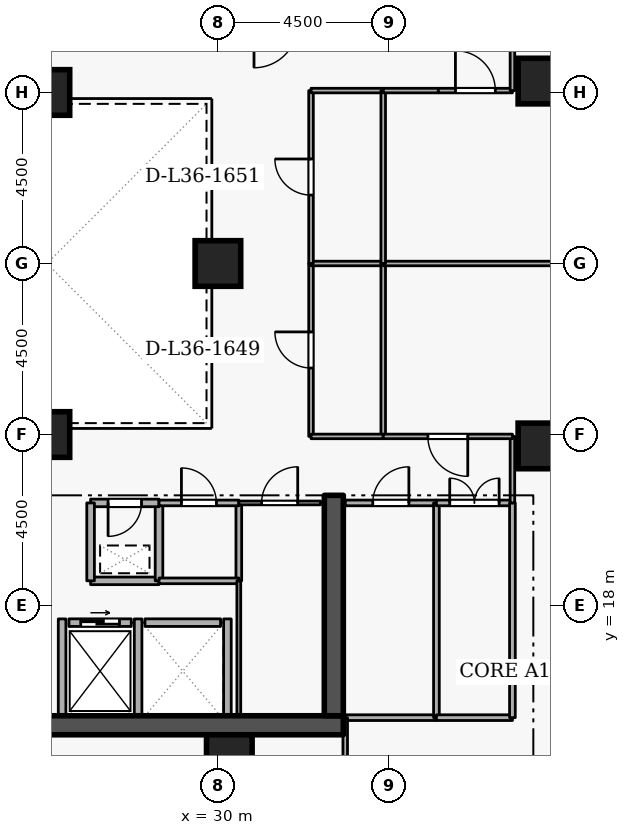
"""IFC4 building model, lengths in metres.
Left out: names, types, materials, properties, quantities, classifications, styles, units other than length and angle.
Written with IfcOpenShell. Run it as: python <this file> out.ifc"""

import sys

from ifc_helpers import new_model, si_unit, direction, frame, frame_2d, origin, origin_2d, place, context, subcontext, project, spatial, rectangle, extrude, element, fill, save


model = new_model("IFC4")
c1 = context("Model", 3, precision=1e-05, world=origin(), true_north=direction((0.0, 1.0)))
c2 = subcontext(c1, "Body", "Model", "MODEL_VIEW")
j1 = project(units=[si_unit("LENGTHUNIT", "METRE"), si_unit("PLANEANGLEUNIT", "RADIAN")], contexts=[c1])
p1 = place(None, origin())
s1 = spatial("IfcSite", under=j1, at=p1, CompositionType="ELEMENT")
p2 = place(p1, origin())
s2 = spatial("IfcBuilding", under=s1, at=p2, CompositionType="ELEMENT")
p3 = place(p2, frame((0.0, 0.0, 137.7)))
s3 = spatial("IfcBuildingStorey", under=s2, at=p3, CompositionType="ELEMENT", Elevation=137.7)
p4 = place(p3, frame((17.7, 14.85, 0.0), z_axis=(0.0, 0.0, 1.0), x_axis=(1.0, 0.0, 0.0)))
e1 = element("IfcWall", 1, at=p4, inside=s3, PredefinedType="SHEAR", context=c2, shape_type="SweptSolid", body=[
    extrude(rectangle(XDim=15.6, YDim=0.5, at=frame_2d((7.8, 0.0))), origin(), (0.0, 0.0, 1.0), 3.6),
])
p5 = place(p3, frame((33.05, 15.1, 0.0), z_axis=(0.0, 0.0, 1.0), x_axis=(0.0, 1.0, 0.0)))
e2 = element("IfcWall", 2, at=p5, inside=s3, PredefinedType="SHEAR", context=c2, shape_type="SweptSolid", body=[
    extrude(rectangle(XDim=5.8, YDim=0.5, at=frame_2d((2.9, 0.0))), origin(), (0.0, 0.0, 1.0), 3.6),
])
for number, where, z_axis, x_axis in (
    (3, (38.5, 22.2, 0.0), (0.0, 0.0, 1.0), (1.0, 0.0, 0.0)),
    (4, (38.5, 31.8, 0.0), (0.0, 0.0, 1.0), (1.0, 0.0, 0.0)),
    (5, (30.3, 14.0, 0.0), (0.0, 0.0, 1.0), (1.0, 0.0, 0.0)),
    (6, (25.5, 22.5, 0.0), (0.0, 0.0, 1.0), (1.0, 0.0, 0.0)),
    (7, (25.5, 31.5, 0.0), (0.0, 0.0, 1.0), (1.0, 0.0, 0.0)),
    (8, (30.0, 27.0, 0.0), (0.0, 0.0, 1.0), (1.0, 0.0, 0.0)),
):
    element("IfcColumn", number, at=place(p3, frame(where, z_axis=z_axis, x_axis=x_axis)), inside=s3, PredefinedType="COLUMN", context=c2, shape_type="SweptSolid", body=[
        extrude(rectangle(XDim=1.2, YDim=1.2, at=origin_2d()), origin(), (0.0, 0.0, 1.0), 3.6),
    ])
p6 = place(p3, frame((26.08, 17.55, 0.0), z_axis=(0.0, 0.0, 1.0), x_axis=(1.0, 0.0, 0.0)))
e9 = element("IfcWall", 9, at=p6, inside=s3, PredefinedType="STANDARD", context=c2, shape_type="SweptSolid", body=[
    extrude(rectangle(XDim=1.64, YDim=0.2, at=frame_2d((0.82, 0.0))), origin(), (0.0, 0.0, 1.0), 3.26),
])
p7 = place(p6, frame((0.31, 0.0, 0.0)))
e10 = element("IfcOpeningElement", 10, at=p7, cuts=e9, PredefinedType="OPENING", context=c2, shape_type="SweptSolid", body=[
    extrude(rectangle(XDim=1.02, YDim=2.06, at=frame_2d((0.51, 1.03))), frame((0.0, 0.11, 0.0), z_axis=(0.0, -1.0, 0.0), x_axis=(1.0, 0.0, 0.0)), (0.0, 0.0, 1.0), 0.22),
])
p8 = place(p3, frame((28.08, 17.55, 0.0), z_axis=(0.0, 0.0, 1.0), x_axis=(1.0, 0.0, 0.0)))
e11 = element("IfcWall", 11, at=p8, inside=s3, PredefinedType="STANDARD", context=c2, shape_type="SweptSolid", body=[
    extrude(rectangle(XDim=1.99, YDim=0.2, at=frame_2d((0.995, 0.0))), origin(), (0.0, 0.0, 1.0), 3.26),
])
for number, where, z_axis, x_axis in (
    (12, (27.9, 15.112, 0.0), (0.0, 0.0, 1.0), (0.0, 1.0, 0.0)),
    (13, (25.9, 15.112, 0.0), (0.0, 0.0, 1.0), (0.0, 1.0, 0.0)),
    (14, (30.25, 15.112, 0.0), (0.0, 0.0, 1.0), (0.0, 1.0, 0.0)),
):
    element("IfcWall", number, at=place(p3, frame(where, z_axis=z_axis, x_axis=x_axis)), inside=s3, PredefinedType="STANDARD", context=c2, shape_type="SweptSolid", body=[
        extrude(rectangle(XDim=2.536, YDim=0.2, at=frame_2d((1.268, 0.0))), origin(), (0.0, 0.0, 1.0), 3.26),
    ])
p9 = place(p3, frame((26.65, 18.65, 0.0), z_axis=(0.0, 0.0, 1.0), x_axis=(1.0, 0.0, 0.0)))
e15 = element("IfcWall", 15, at=p9, inside=s3, PredefinedType="STANDARD", context=c2, shape_type="SweptSolid", body=[
    extrude(rectangle(XDim=1.8, YDim=0.2, at=frame_2d((0.9, 0.0))), origin(), (0.0, 0.0, 1.0), 3.26),
])
p10 = place(p3, frame((28.45, 18.65, 0.0), z_axis=(0.0, 0.0, 1.0), x_axis=(0.0, 1.0, 0.0)))
e16 = element("IfcWall", 16, at=p10, inside=s3, PredefinedType="STANDARD", context=c2, shape_type="SweptSolid", body=[
    extrude(rectangle(XDim=2.05, YDim=0.2, at=frame_2d((1.025, 0.0))), origin(), (0.0, 0.0, 1.0), 3.26),
])
p11 = place(p3, frame((28.45, 20.7, 0.0), z_axis=(0.0, 0.0, 1.0), x_axis=(-1.0, 0.0, 0.0)))
e17 = element("IfcWall", 17, at=p11, inside=s3, PredefinedType="STANDARD", context=c2, shape_type="SweptSolid", body=[
    extrude(rectangle(XDim=1.8, YDim=0.2, at=frame_2d((0.9, 0.0))), origin(), (0.0, 0.0, 1.0), 3.26),
])
p12 = place(p11, frame((0.46, 0.0, 0.0)))
e18 = element("IfcOpeningElement", 18, at=p12, cuts=e17, PredefinedType="OPENING", context=c2, shape_type="SweptSolid", body=[
    extrude(rectangle(XDim=0.88, YDim=2.04, at=frame_2d((0.44, 1.02))), frame((0.0, 0.11, 0.0), z_axis=(0.0, -1.0, 0.0), x_axis=(1.0, 0.0, 0.0)), (0.0, 0.0, 1.0), 0.22),
])
p13 = place(p3, frame((26.65, 20.7, 0.0), z_axis=(0.0, 0.0, 1.0), x_axis=(0.0, -1.0, 0.0)))
e19 = element("IfcWall", 19, at=p13, inside=s3, PredefinedType="STANDARD", context=c2, shape_type="SweptSolid", body=[
    extrude(rectangle(XDim=2.05, YDim=0.2, at=frame_2d((1.025, 0.0))), origin(), (0.0, 0.0, 1.0), 3.26),
])
p14 = place(p3, frame((30.55, 20.7, 0.0), z_axis=(0.0, 0.0, 1.0), x_axis=(0.0, -1.0, 0.0)))
e20 = element("IfcWall", 20, at=p14, inside=s3, PredefinedType="PARTITIONING", context=c2, shape_type="SweptSolid", body=[
    extrude(rectangle(XDim=2.05, YDim=0.15, at=frame_2d((1.025, 0.0))), origin(), (0.0, 0.0, 1.0), 3.26),
])
p15 = place(p3, frame((30.55, 18.65, 0.0), z_axis=(0.0, 0.0, 1.0), x_axis=(-1.0, 0.0, 0.0)))
e21 = element("IfcWall", 21, at=p15, inside=s3, PredefinedType="PARTITIONING", context=c2, shape_type="SweptSolid", body=[
    extrude(rectangle(XDim=2.1, YDim=0.15, at=frame_2d((1.05, 0.0))), origin(), (0.0, 0.0, 1.0), 3.26),
])
p16 = place(p3, frame((28.45, 20.7, 0.0), z_axis=(0.0, 0.0, 1.0), x_axis=(1.0, 0.0, 0.0)))
e22 = element("IfcWall", 22, at=p16, inside=s3, PredefinedType="PARTITIONING", context=c2, shape_type="SweptSolid", body=[
    extrude(rectangle(XDim=2.1, YDim=0.15, at=frame_2d((1.05, 0.0))), origin(), (0.0, 0.0, 1.0), 3.26),
])
p17 = place(p16, frame((0.59, 0.0, 0.0)))
e23 = element("IfcOpeningElement", 23, at=p17, cuts=e22, PredefinedType="OPENING", context=c2, shape_type="SweptSolid", body=[
    extrude(rectangle(XDim=0.92, YDim=2.08, at=frame_2d((0.46, 1.04))), frame((0.0, 0.085, 0.0), z_axis=(0.0, -1.0, 0.0), x_axis=(1.0, 0.0, 0.0)), (0.0, 0.0, 1.0), 0.17),
])
p18 = place(p3, frame((30.55, 15.1, 0.0), z_axis=(0.0, 0.0, 1.0), x_axis=(0.0, 1.0, 0.0)))
e24 = element("IfcWall", 24, at=p18, inside=s3, PredefinedType="PARTITIONING", context=c2, shape_type="SweptSolid", body=[
    extrude(rectangle(XDim=3.55, YDim=0.1, at=frame_2d((1.775, 0.0))), origin(), (0.0, 0.0, 1.0), 3.26),
])
p19 = place(p3, frame((30.55, 20.7, 0.0), z_axis=(0.0, 0.0, 1.0), x_axis=(1.0, 0.0, 0.0)))
e25 = element("IfcWall", 25, at=p19, inside=s3, PredefinedType="PARTITIONING", context=c2, shape_type="SweptSolid", body=[
    extrude(rectangle(XDim=2.15, YDim=0.1, at=frame_2d((1.075, 0.0))), origin(), (0.0, 0.0, 1.0), 3.26),
])
p20 = place(p19, frame((0.6, 0.0, 0.0)))
e26 = element("IfcOpeningElement", 26, at=p20, cuts=e25, PredefinedType="OPENING", context=c2, shape_type="SweptSolid", body=[
    extrude(rectangle(XDim=0.95, YDim=2.1, at=frame_2d((0.475, 1.05))), frame((0.0, 0.06, 0.0), z_axis=(0.0, -1.0, 0.0), x_axis=(1.0, 0.0, 0.0)), (0.0, 0.0, 1.0), 0.12),
])
p21 = place(p3, frame((35.75, 15.05, 0.0), z_axis=(0.0, 0.0, 1.0), x_axis=(-1.0, 0.0, 0.0)))
e27 = element("IfcWall", 27, at=p21, inside=s3, PredefinedType="PARTITIONING", context=c2, shape_type="SweptSolid", body=[
    extrude(rectangle(XDim=2.4, YDim=0.15, at=frame_2d((1.2, 0.0))), origin(), (0.0, 0.0, 1.0), 3.26),
])
p22 = place(p3, frame((33.35, 20.7, 0.0), z_axis=(0.0, 0.0, 1.0), x_axis=(1.0, 0.0, 0.0)))
e28 = element("IfcWall", 28, at=p22, inside=s3, PredefinedType="PARTITIONING", context=c2, shape_type="SweptSolid", body=[
    extrude(rectangle(XDim=2.4, YDim=0.15, at=frame_2d((1.2, 0.0))), origin(), (0.0, 0.0, 1.0), 3.26),
])
p23 = place(p22, frame((0.725, 0.0, 0.0)))
e29 = element("IfcOpeningElement", 29, at=p23, cuts=e28, PredefinedType="OPENING", context=c2, shape_type="SweptSolid", body=[
    extrude(rectangle(XDim=0.95, YDim=2.1, at=frame_2d((0.475, 1.05))), frame((0.0, 0.085, 0.0), z_axis=(0.0, -1.0, 0.0), x_axis=(1.0, 0.0, 0.0)), (0.0, 0.0, 1.0), 0.17),
])
p24 = place(p3, frame((35.75, 20.7, 0.0), z_axis=(0.0, 0.0, 1.0), x_axis=(0.0, -1.0, 0.0)))
e30 = element("IfcWall", 30, at=p24, inside=s3, PredefinedType="PARTITIONING", context=c2, shape_type="SweptSolid", body=[
    extrude(rectangle(XDim=5.65, YDim=0.15, at=frame_2d((2.825, 0.0))), origin(), (0.0, 0.0, 1.0), 3.26),
])
p25 = place(p3, frame((37.75, 15.05, 0.0), z_axis=(0.0, 0.0, 1.0), x_axis=(-1.0, 0.0, 0.0)))
e31 = element("IfcWall", 31, at=p25, inside=s3, PredefinedType="PARTITIONING", context=c2, shape_type="SweptSolid", body=[
    extrude(rectangle(XDim=2.0, YDim=0.15, at=frame_2d((1.0, 0.0))), origin(), (0.0, 0.0, 1.0), 3.26),
])
p26 = place(p3, frame((35.75, 20.7, 0.0), z_axis=(0.0, 0.0, 1.0), x_axis=(1.0, 0.0, 0.0)))
e32 = element("IfcWall", 32, at=p26, inside=s3, PredefinedType="PARTITIONING", context=c2, shape_type="SweptSolid", body=[
    extrude(rectangle(XDim=2.0, YDim=0.15, at=frame_2d((1.0, 0.0))), origin(), (0.0, 0.0, 1.0), 3.26),
])
p27 = place(p26, frame((0.35, 0.0, 0.0)))
e33 = element("IfcOpeningElement", 33, at=p27, cuts=e32, PredefinedType="OPENING", context=c2, shape_type="SweptSolid", body=[
    extrude(rectangle(XDim=1.3, YDim=2.12, at=frame_2d((0.65, 1.06))), frame((0.0, 0.085, 0.0), z_axis=(0.0, -1.0, 0.0), x_axis=(1.0, 0.0, 0.0)), (0.0, 0.0, 1.0), 0.17),
])
p28 = place(p3, frame((37.75, 20.7, 0.0), z_axis=(0.0, 0.0, 1.0), x_axis=(0.0, -1.0, 0.0)))
e34 = element("IfcWall", 34, at=p28, inside=s3, PredefinedType="PARTITIONING", context=c2, shape_type="SweptSolid", body=[
    extrude(rectangle(XDim=5.65, YDim=0.15, at=frame_2d((2.825, 0.0))), origin(), (0.0, 0.0, 1.0), 3.26),
])
p29 = place(p3, frame((32.45, 22.45, 0.0), z_axis=(0.0, 0.0, 1.0), x_axis=(0.0, 1.0, 0.0)))
e35 = element("IfcWall", 35, at=p29, inside=s3, PredefinedType="PARTITIONING", context=c2, shape_type="SweptSolid", body=[
    extrude(rectangle(XDim=4.55, YDim=0.12, at=frame_2d((2.275, 0.0))), origin(), (0.0, 0.0, 1.0), 3.26),
])
p30 = place(p29, frame((1.8, 0.0, 0.0)))
e36 = element("IfcOpeningElement", 36, at=p30, cuts=e35, PredefinedType="OPENING", context=c2, shape_type="SweptSolid", body=[
    extrude(rectangle(XDim=0.95, YDim=2.1, at=frame_2d((0.475, 1.05))), frame((0.0, 0.07, 0.0), z_axis=(0.0, -1.0, 0.0), x_axis=(1.0, 0.0, 0.0)), (0.0, 0.0, 1.0), 0.14),
])
p31 = place(p3, frame((32.45, 27.0, 0.0), z_axis=(0.0, 0.0, 1.0), x_axis=(1.0, 0.0, 0.0)))
e37 = element("IfcWall", 37, at=p31, inside=s3, PredefinedType="PARTITIONING", context=c2, shape_type="SweptSolid", body=[
    extrude(rectangle(XDim=1.9, YDim=0.12, at=frame_2d((0.95, 0.0))), origin(), (0.0, 0.0, 1.0), 2.802),
])
p32 = place(p3, frame((34.35, 27.0, 0.0), z_axis=(0.0, 0.0, 1.0), x_axis=(0.0, -1.0, 0.0)))
e38 = element("IfcWall", 38, at=p32, inside=s3, PredefinedType="PARTITIONING", context=c2, shape_type="SweptSolid", body=[
    extrude(rectangle(XDim=4.55, YDim=0.12, at=frame_2d((2.275, 0.0))), origin(), (0.0, 0.0, 1.0), 3.26),
])
p33 = place(p3, frame((34.35, 22.45, 0.0), z_axis=(0.0, 0.0, 1.0), x_axis=(-1.0, 0.0, 0.0)))
e39 = element("IfcWall", 39, at=p33, inside=s3, PredefinedType="PARTITIONING", context=c2, shape_type="SweptSolid", body=[
    extrude(rectangle(XDim=1.9, YDim=0.12, at=frame_2d((0.95, 0.0))), origin(), (0.0, 0.0, 1.0), 3.26),
])
p34 = place(p3, frame((33.35, 3.28, 0.0), z_axis=(0.0, 0.0, 1.0), x_axis=(0.0, 1.0, 0.0)))
e40 = element("IfcWall", 40, at=p34, inside=s3, PredefinedType="PARTITIONING", context=c2, shape_type="SweptSolid", body=[
    extrude(rectangle(XDim=11.77, YDim=0.12, at=frame_2d((5.885, 0.0))), origin(), (0.0, 0.0, 1.0), 2.465),
])
p35 = place(p3, frame((37.75, 20.7, 0.0), z_axis=(0.0, 0.0, 1.0), x_axis=(0.0, 1.0, 0.0)))
e41 = element("IfcWall", 41, at=p35, inside=s3, PredefinedType="PARTITIONING", context=c2, shape_type="SweptSolid", body=[
    extrude(rectangle(XDim=1.75, YDim=0.12, at=frame_2d((0.875, 0.0))), origin(), (0.0, 0.0, 1.0), 3.26),
])
p36 = place(p3, frame((37.75, 22.45, 0.0), z_axis=(0.0, 0.0, 1.0), x_axis=(-1.0, 0.0, 0.0)))
e42 = element("IfcWall", 42, at=p36, inside=s3, PredefinedType="PARTITIONING", context=c2, shape_type="SweptSolid", body=[
    extrude(rectangle(XDim=3.4, YDim=0.12, at=frame_2d((1.7, 0.0))), origin(), (0.0, 0.0, 1.0), 3.26),
])
p37 = place(p36, frame((1.175, 0.0, 0.0)))
e43 = element("IfcOpeningElement", 43, at=p37, cuts=e42, PredefinedType="OPENING", context=c2, shape_type="SweptSolid", body=[
    extrude(rectangle(XDim=1.05, YDim=2.1, at=frame_2d((0.525, 1.05))), frame((0.0, 0.07, 0.0), z_axis=(0.0, -1.0, 0.0), x_axis=(1.0, 0.0, 0.0)), (0.0, 0.0, 1.0), 0.14),
])
p38 = place(p3, frame((34.35, 27.0, 0.0), z_axis=(0.0, 0.0, 1.0), x_axis=(1.0, 0.0, 0.0)))
e44 = element("IfcWall", 44, at=p38, inside=s3, PredefinedType="PARTITIONING", context=c2, shape_type="SweptSolid", body=[
    extrude(rectangle(XDim=8.87, YDim=0.12, at=frame_2d((4.435, 0.0))), origin(), (0.0, 0.0, 1.0), 2.802),
])
p39 = place(p3, frame((32.45, 27.0, 0.0), z_axis=(0.0, 0.0, 1.0), x_axis=(0.0, 1.0, 0.0)))
e45 = element("IfcWall", 45, at=p39, inside=s3, PredefinedType="PARTITIONING", context=c2, shape_type="SweptSolid", body=[
    extrude(rectangle(XDim=4.55, YDim=0.12, at=frame_2d((2.275, 0.0))), origin(), (0.0, 0.0, 1.0), 3.26),
])
p40 = place(p39, frame((1.8, 0.0, 0.0)))
e46 = element("IfcOpeningElement", 46, at=p40, cuts=e45, PredefinedType="OPENING", context=c2, shape_type="SweptSolid", body=[
    extrude(rectangle(XDim=0.95, YDim=2.1, at=frame_2d((0.475, 1.05))), frame((0.0, 0.07, 0.0), z_axis=(0.0, -1.0, 0.0), x_axis=(1.0, 0.0, 0.0)), (0.0, 0.0, 1.0), 0.14),
])
p41 = place(p3, frame((32.45, 31.55, 0.0), z_axis=(0.0, 0.0, 1.0), x_axis=(1.0, 0.0, 0.0)))
e47 = element("IfcWall", 47, at=p41, inside=s3, PredefinedType="PARTITIONING", context=c2, shape_type="SweptSolid", body=[
    extrude(rectangle(XDim=1.9, YDim=0.12, at=frame_2d((0.95, 0.0))), origin(), (0.0, 0.0, 1.0), 3.26),
])
p42 = place(p3, frame((34.35, 31.55, 0.0), z_axis=(0.0, 0.0, 1.0), x_axis=(0.0, -1.0, 0.0)))
e48 = element("IfcWall", 48, at=p42, inside=s3, PredefinedType="PARTITIONING", context=c2, shape_type="SweptSolid", body=[
    extrude(rectangle(XDim=4.55, YDim=0.12, at=frame_2d((2.275, 0.0))), origin(), (0.0, 0.0, 1.0), 3.26),
])
p43 = place(p3, frame((34.35, 31.55, 0.0), z_axis=(0.0, 0.0, 1.0), x_axis=(1.0, 0.0, 0.0)))
e49 = element("IfcWall", 49, at=p43, inside=s3, PredefinedType="PARTITIONING", context=c2, shape_type="SweptSolid", body=[
    extrude(rectangle(XDim=1.45, YDim=0.12, at=frame_2d((0.725, 0.0))), origin(), (0.0, 0.0, 1.0), 3.26),
])
p44 = place(p3, frame((35.8, 31.55, 0.0), z_axis=(0.0, 0.0, 1.0), x_axis=(1.0, 0.0, 0.0)))
e50 = element("IfcWall", 50, at=p44, inside=s3, PredefinedType="PARTITIONING", context=c2, shape_type="SweptSolid", body=[
    extrude(rectangle(XDim=1.95, YDim=0.12, at=frame_2d((0.975, 0.0))), origin(), (0.0, 0.0, 1.0), 3.26),
])
p45 = place(p44, frame((0.45, 0.0, 0.0)))
e51 = element("IfcOpeningElement", 51, at=p45, cuts=e50, PredefinedType="OPENING", context=c2, shape_type="SweptSolid", body=[
    extrude(rectangle(XDim=1.05, YDim=2.1, at=frame_2d((0.525, 1.05))), frame((0.0, 0.07, 0.0), z_axis=(0.0, -1.0, 0.0), x_axis=(1.0, 0.0, 0.0)), (0.0, 0.0, 1.0), 0.14),
])
p46 = place(p3, frame((37.75, 31.55, 0.0), z_axis=(0.0, 0.0, 1.0), x_axis=(0.0, 1.0, 0.0)))
e52 = element("IfcWall", 52, at=p46, inside=s3, PredefinedType="PARTITIONING", context=c2, shape_type="SweptSolid", body=[
    extrude(rectangle(XDim=1.75, YDim=0.12, at=frame_2d((0.875, 0.0))), origin(), (0.0, 0.0, 1.0), 3.26),
])
p47 = place(p7, origin())
e53 = element("IfcDoor", 53, at=p47, inside=s3, OperationType="SLIDING_TO_LEFT", PredefinedType="DOOR", context=c2, shape_type="SweptSolid", body=[
    extrude(rectangle(XDim=1.02, YDim=2.06, at=frame_2d((0.51, 1.03))), frame((0.0, 0.025, 0.0), z_axis=(0.0, -1.0, 0.0), x_axis=(1.0, 0.0, 0.0)), (0.0, 0.0, 1.0), 0.05),
])
fill(e10, e53)
p48 = place(p12, origin())
e54 = element("IfcDoor", 54, at=p48, inside=s3, OperationType="SINGLE_SWING_RIGHT", PredefinedType="DOOR", context=c2, shape_type="SweptSolid", body=[
    extrude(rectangle(XDim=0.88, YDim=2.04, at=frame_2d((0.44, 1.02))), frame((0.0, 0.025, 0.0), z_axis=(0.0, -1.0, 0.0), x_axis=(1.0, 0.0, 0.0)), (0.0, 0.0, 1.0), 0.05),
])
fill(e18, e54)
p49 = place(p17, origin())
e55 = element("IfcDoor", 55, at=p49, inside=s3, OperationType="SINGLE_SWING_LEFT", PredefinedType="DOOR", context=c2, shape_type="SweptSolid", body=[
    extrude(rectangle(XDim=0.92, YDim=2.08, at=frame_2d((0.46, 1.04))), frame((0.0, 0.025, 0.0), z_axis=(0.0, -1.0, 0.0), x_axis=(1.0, 0.0, 0.0)), (0.0, 0.0, 1.0), 0.05),
])
fill(e23, e55)
p50 = place(p20, origin())
e56 = element("IfcDoor", 56, at=p50, inside=s3, OperationType="SINGLE_SWING_RIGHT", PredefinedType="DOOR", context=c2, shape_type="SweptSolid", body=[
    extrude(rectangle(XDim=0.95, YDim=2.1, at=frame_2d((0.475, 1.05))), frame((0.0, 0.025, 0.0), z_axis=(0.0, -1.0, 0.0), x_axis=(1.0, 0.0, 0.0)), (0.0, 0.0, 1.0), 0.05),
])
fill(e26, e56)
p51 = place(p23, origin())
e57 = element("IfcDoor", 57, at=p51, inside=s3, OperationType="SINGLE_SWING_RIGHT", PredefinedType="DOOR", context=c2, shape_type="SweptSolid", body=[
    extrude(rectangle(XDim=0.95, YDim=2.1, at=frame_2d((0.475, 1.05))), frame((0.0, 0.025, 0.0), z_axis=(0.0, -1.0, 0.0), x_axis=(1.0, 0.0, 0.0)), (0.0, 0.0, 1.0), 0.05),
])
fill(e29, e57)
p52 = place(p27, origin())
e58 = element("IfcDoor", 58, at=p52, inside=s3, OperationType="DOUBLE_DOOR_SINGLE_SWING", PredefinedType="DOOR", context=c2, shape_type="SweptSolid", body=[
    extrude(rectangle(XDim=1.3, YDim=2.12, at=frame_2d((0.65, 1.06))), frame((0.0, 0.025, 0.0), z_axis=(0.0, -1.0, 0.0), x_axis=(1.0, 0.0, 0.0)), (0.0, 0.0, 1.0), 0.05),
])
fill(e33, e58)
p53 = place(p30, origin())
e59 = element("IfcDoor", 59, at=p53, inside=s3, OperationType="SINGLE_SWING_RIGHT", PredefinedType="DOOR", context=c2, shape_type="SweptSolid", body=[
    extrude(rectangle(XDim=0.95, YDim=2.1, at=frame_2d((0.475, 1.05))), frame((0.0, 0.025, 0.0), z_axis=(0.0, -1.0, 0.0), x_axis=(1.0, 0.0, 0.0)), (0.0, 0.0, 1.0), 0.05),
])
fill(e36, e59)
p54 = place(p37, origin())
e60 = element("IfcDoor", 60, at=p54, inside=s3, OperationType="SINGLE_SWING_LEFT", PredefinedType="DOOR", context=c2, shape_type="SweptSolid", body=[
    extrude(rectangle(XDim=1.05, YDim=2.1, at=frame_2d((0.525, 1.05))), frame((0.0, 0.025, 0.0), z_axis=(0.0, -1.0, 0.0), x_axis=(1.0, 0.0, 0.0)), (0.0, 0.0, 1.0), 0.05),
])
fill(e43, e60)
p55 = place(p40, origin())
e61 = element("IfcDoor", 61, at=p55, inside=s3, OperationType="SINGLE_SWING_RIGHT", PredefinedType="DOOR", context=c2, shape_type="SweptSolid", body=[
    extrude(rectangle(XDim=0.95, YDim=2.1, at=frame_2d((0.475, 1.05))), frame((0.0, 0.025, 0.0), z_axis=(0.0, -1.0, 0.0), x_axis=(1.0, 0.0, 0.0)), (0.0, 0.0, 1.0), 0.05),
])
fill(e46, e61)
p56 = place(p45, origin())
e62 = element("IfcDoor", 62, at=p56, inside=s3, OperationType="SINGLE_SWING_LEFT", PredefinedType="DOOR", context=c2, shape_type="SweptSolid", body=[
    extrude(rectangle(XDim=1.05, YDim=2.1, at=frame_2d((0.525, 1.05))), frame((0.0, 0.025, 0.0), z_axis=(0.0, -1.0, 0.0), x_axis=(1.0, 0.0, 0.0)), (0.0, 0.0, 1.0), 0.05),
])
fill(e51, e62)
save(model, sys.argv[1])
